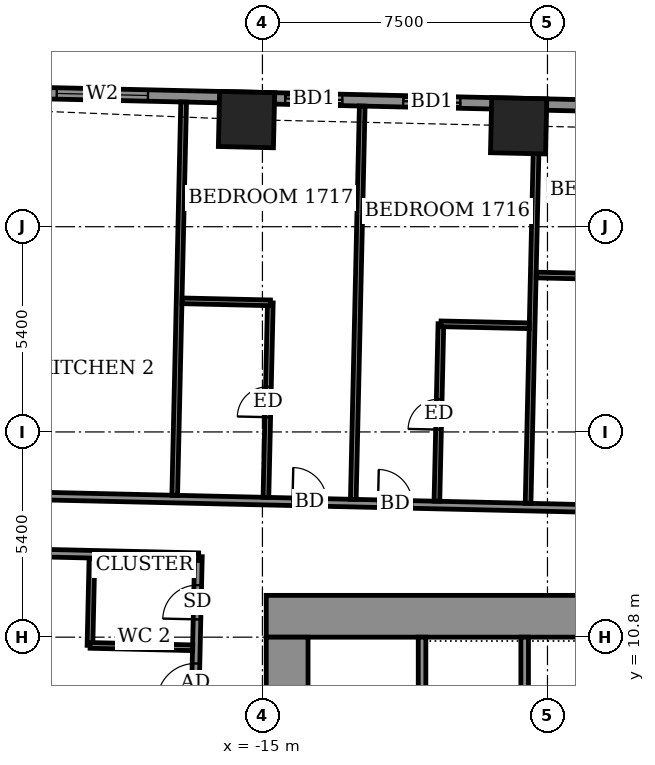
"""IFC4 building model, lengths in metres.
Left out: names, types, materials, properties, quantities, classifications, styles, units other than length and angle.
Written with IfcOpenShell. Run it as: python <this file> out.ifc"""

import sys

from ifc_helpers import new_model, si_unit, direction, frame, frame_2d, origin, origin_2d, place, context, subcontext, project, spatial, rectangle, extrude, element, fill, save


model = new_model("IFC4")
c1 = context("Model", 3, precision=1e-05, world=origin(), true_north=direction((0.0, 1.0)))
c2 = subcontext(c1, "Body", "Model", "MODEL_VIEW")
j1 = project(units=[si_unit("LENGTHUNIT", "METRE"), si_unit("PLANEANGLEUNIT", "RADIAN")], contexts=[c1])
p1 = place(None, origin())
s1 = spatial("IfcSite", under=j1, at=p1, CompositionType="ELEMENT")
p2 = place(p1, origin())
s2 = spatial("IfcBuilding", under=s1, at=p2, CompositionType="ELEMENT")
p3 = place(p2, frame((0.0, 0.0, 71.1)))
s3 = spatial("IfcBuildingStorey", under=s2, at=p3, CompositionType="ELEMENT", Elevation=71.1)
for number, where, z_axis, x_axis in (
    (1, (-8.259, 24.255, -0.55), (0.0, 0.0, 1.0), (-1.0, 0.023, 0.0)),
    (2, (-15.418, 24.418, -0.55), (0.0, 0.0, 1.0), (-1.0, 0.023, 0.0)),
):
    element("IfcColumn", number, at=place(p3, frame(where, z_axis=z_axis, x_axis=x_axis)), inside=s3, PredefinedType="COLUMN", context=c2, shape_type="SweptSolid", body=[
        extrude(rectangle(XDim=1.45, YDim=1.45, at=origin_2d()), origin(), (0.0, 0.0, 1.0), 3.6),
    ])
p4 = place(p3, frame((27.407, 24.021, 0.0), z_axis=(0.0, 0.0, 1.0), x_axis=(-0.99974239923, 0.022696589664, 0.0)))
e3 = element("IfcWall", 3, at=p4, inside=s3, PredefinedType="SOLIDWALL", context=c2, shape_type="SweptSolid", body=[
    extrude(rectangle(XDim=49.836, YDim=0.3, at=frame_2d((24.918, 0.0))), origin(), (0.0, 0.0, 1.0), 3.05),
])
p5 = place(p4, frame((2.998, 0.0, 0.0)))
e4 = element("IfcOpeningElement", 4, at=p5, cuts=e3, PredefinedType="OPENING", context=c2, shape_type="SweptSolid", body=[
    extrude(rectangle(XDim=1.5, YDim=2.4, at=frame_2d((0.75, 1.2))), frame((0.0, 0.16, 0.0), z_axis=(0.0, -1.0, 0.0), x_axis=(1.0, 0.0, 0.0)), (0.0, 0.0, 1.0), 0.32),
])
p6 = place(p4, frame((9.086, 0.0, 0.0)))
e5 = element("IfcOpeningElement", 5, at=p6, cuts=e3, PredefinedType="OPENING", context=c2, shape_type="SweptSolid", body=[
    extrude(rectangle(XDim=1.5, YDim=2.4, at=frame_2d((0.75, 1.2))), frame((0.0, 0.16, 0.0), z_axis=(0.0, -1.0, 0.0), x_axis=(1.0, 0.0, 0.0)), (0.0, 0.0, 1.0), 0.32),
])
p7 = place(p4, frame((15.017, 0.0, 0.0)))
e6 = element("IfcOpeningElement", 6, at=p7, cuts=e3, PredefinedType="OPENING", context=c2, shape_type="SweptSolid", body=[
    extrude(rectangle(XDim=1.5, YDim=2.4, at=frame_2d((0.75, 1.2))), frame((0.0, 0.16, 0.0), z_axis=(0.0, -1.0, 0.0), x_axis=(1.0, 0.0, 0.0)), (0.0, 0.0, 1.0), 0.32),
])
p8 = place(p4, frame((18.124, 0.0, 0.0)))
e7 = element("IfcOpeningElement", 7, at=p8, cuts=e3, PredefinedType="OPENING", context=c2, shape_type="SweptSolid", body=[
    extrude(rectangle(XDim=1.5, YDim=2.4, at=frame_2d((0.75, 1.2))), frame((0.0, 0.16, 0.0), z_axis=(0.0, -1.0, 0.0), x_axis=(1.0, 0.0, 0.0)), (0.0, 0.0, 1.0), 0.32),
])
p9 = place(p4, frame((23.149, 0.0, 0.0)))
e8 = element("IfcOpeningElement", 8, at=p9, cuts=e3, PredefinedType="OPENING", context=c2, shape_type="SweptSolid", body=[
    extrude(rectangle(XDim=1.5, YDim=2.4, at=frame_2d((0.75, 1.2))), frame((0.0, 0.16, 0.0), z_axis=(0.0, -1.0, 0.0), x_axis=(1.0, 0.0, 0.0)), (0.0, 0.0, 1.0), 0.32),
])
p10 = place(p4, frame((26.405, 0.0, 0.0)))
e9 = element("IfcOpeningElement", 9, at=p10, cuts=e3, PredefinedType="OPENING", context=c2, shape_type="SweptSolid", body=[
    extrude(rectangle(XDim=1.2, YDim=2.4, at=frame_2d((0.6, 1.2))), frame((0.0, 0.16, 0.0), z_axis=(0.0, -1.0, 0.0), x_axis=(1.0, 0.0, 0.0)), (0.0, 0.0, 1.0), 0.32),
])
p11 = place(p4, frame((31.986, 0.0, 0.0)))
e10 = element("IfcOpeningElement", 10, at=p11, cuts=e3, PredefinedType="OPENING", context=c2, shape_type="SweptSolid", body=[
    extrude(rectangle(XDim=1.5, YDim=2.4, at=frame_2d((0.75, 1.2))), frame((0.0, 0.16, 0.0), z_axis=(0.0, -1.0, 0.0), x_axis=(1.0, 0.0, 0.0)), (0.0, 0.0, 1.0), 0.32),
])
p12 = place(p4, frame((37.211, 0.0, 0.0)))
e11 = element("IfcOpeningElement", 11, at=p12, cuts=e3, PredefinedType="OPENING", context=c2, shape_type="SweptSolid", body=[
    extrude(rectangle(XDim=1.5, YDim=2.4, at=frame_2d((0.75, 1.2))), frame((0.0, 0.16, 0.0), z_axis=(0.0, -1.0, 0.0), x_axis=(1.0, 0.0, 0.0)), (0.0, 0.0, 1.0), 0.32),
])
p13 = place(p4, frame((40.317, 0.0, 0.0)))
e12 = element("IfcOpeningElement", 12, at=p13, cuts=e3, PredefinedType="OPENING", context=c2, shape_type="SweptSolid", body=[
    extrude(rectangle(XDim=1.5, YDim=2.4, at=frame_2d((0.75, 1.2))), frame((0.0, 0.16, 0.0), z_axis=(0.0, -1.0, 0.0), x_axis=(1.0, 0.0, 0.0)), (0.0, 0.0, 1.0), 0.32),
])
p14 = place(p4, frame((45.431, 0.0, 0.9)))
e13 = element("IfcOpeningElement", 13, at=p14, cuts=e3, PredefinedType="OPENING", context=c2, shape_type="SweptSolid", body=[
    extrude(rectangle(XDim=2.4, YDim=1.5, at=frame_2d((1.2, 0.75))), frame((0.0, 0.16, 0.0), z_axis=(0.0, -1.0, 0.0), x_axis=(1.0, 0.0, 0.0)), (0.0, 0.0, 1.0), 0.32),
])
p15 = place(p3, frame((-17.287, -13.625, 0.0), z_axis=(0.0, 0.0, 1.0), x_axis=(0.022712214871, 0.999742044377, 0.0)))
e14 = element("IfcWall", 14, at=p15, inside=s3, PredefinedType="PARTITIONING", context=c2, shape_type="SweptSolid", body=[
    extrude(rectangle(XDim=26.551, YDim=0.2, at=frame_2d((13.275, 0.0))), origin(), (0.0, 0.0, 1.0), 3.05),
])
p16 = place(p15, frame((22.738, 0.0, 0.0)))
e15 = element("IfcOpeningElement", 15, at=p16, cuts=e14, PredefinedType="OPENING", context=c2, shape_type="SweptSolid", body=[
    extrude(rectangle(XDim=1.0, YDim=2.1, at=frame_2d((0.5, 1.05))), frame((0.0, 0.11, 0.0), z_axis=(0.0, -1.0, 0.0), x_axis=(1.0, 0.0, 0.0)), (0.0, 0.0, 1.0), 0.22),
])
p17 = place(p15, frame((24.9, 0.0, 0.0)))
e16 = element("IfcOpeningElement", 16, at=p17, cuts=e14, PredefinedType="OPENING", context=c2, shape_type="SweptSolid", body=[
    extrude(rectangle(XDim=0.9, YDim=2.1, at=frame_2d((0.45, 1.05))), frame((0.0, 0.11, 0.0), z_axis=(0.0, -1.0, 0.0), x_axis=(1.0, 0.0, 0.0)), (0.0, 0.0, 1.0), 0.22),
])
p18 = place(p15, frame((20.3, 0.0, 0.0)))
e17 = element("IfcOpeningElement", 17, at=p18, cuts=e14, PredefinedType="OPENING", context=c2, shape_type="SweptSolid", body=[
    extrude(rectangle(XDim=1.0, YDim=2.1, at=frame_2d((0.5, 1.05))), frame((0.0, 0.11, 0.0), z_axis=(0.0, -1.0, 0.0), x_axis=(1.0, 0.0, 0.0)), (0.0, 0.0, 1.0), 0.22),
])
p19 = place(p15, frame((15.025, 0.0, 0.0)))
e18 = element("IfcOpeningElement", 18, at=p19, cuts=e14, PredefinedType="OPENING", context=c2, shape_type="SweptSolid", body=[
    extrude(rectangle(XDim=1.0, YDim=2.1, at=frame_2d((0.5, 1.05))), frame((0.0, 0.11, 0.0), z_axis=(0.0, -1.0, 0.0), x_axis=(1.0, 0.0, 0.0)), (0.0, 0.0, 1.0), 0.22),
])
p20 = place(p15, frame((17.525, 0.0, 0.0)))
e19 = element("IfcOpeningElement", 19, at=p20, cuts=e14, PredefinedType="OPENING", context=c2, shape_type="SweptSolid", body=[
    extrude(rectangle(XDim=0.9, YDim=2.1, at=frame_2d((0.45, 1.05))), frame((0.0, 0.11, 0.0), z_axis=(0.0, -1.0, 0.0), x_axis=(1.0, 0.0, 0.0)), (0.0, 0.0, 1.0), 0.22),
])
p21 = place(p15, frame((11.678, 0.0, 0.0)))
e20 = element("IfcOpeningElement", 20, at=p21, cuts=e14, PredefinedType="OPENING", context=c2, shape_type="SweptSolid", body=[
    extrude(rectangle(XDim=1.0, YDim=2.1, at=frame_2d((0.5, 1.05))), frame((0.0, 0.11, 0.0), z_axis=(0.0, -1.0, 0.0), x_axis=(1.0, 0.0, 0.0)), (0.0, 0.0, 1.0), 0.22),
])
p22 = place(p15, frame((8.45, 0.0, 0.0)))
e21 = element("IfcOpeningElement", 21, at=p22, cuts=e14, PredefinedType="OPENING", context=c2, shape_type="SweptSolid", body=[
    extrude(rectangle(XDim=1.0, YDim=2.1, at=frame_2d((0.5, 1.05))), frame((0.0, 0.11, 0.0), z_axis=(0.0, -1.0, 0.0), x_axis=(1.0, 0.0, 0.0)), (0.0, 0.0, 1.0), 0.22),
])
p23 = place(p15, frame((6.275, 0.0, 0.0)))
e22 = element("IfcOpeningElement", 22, at=p23, cuts=e14, PredefinedType="OPENING", context=c2, shape_type="SweptSolid", body=[
    extrude(rectangle(XDim=0.9, YDim=2.1, at=frame_2d((0.45, 1.05))), frame((0.0, 0.11, 0.0), z_axis=(0.0, -1.0, 0.0), x_axis=(1.0, 0.0, 0.0)), (0.0, 0.0, 1.0), 0.22),
])
p24 = place(p15, frame((1.062, 0.0, 0.0)))
e23 = element("IfcOpeningElement", 23, at=p24, cuts=e14, PredefinedType="OPENING", context=c2, shape_type="SweptSolid", body=[
    extrude(rectangle(XDim=1.0, YDim=2.1, at=frame_2d((0.5, 1.05))), frame((0.0, 0.11, 0.0), z_axis=(0.0, -1.0, 0.0), x_axis=(1.0, 0.0, 0.0)), (0.0, 0.0, 1.0), 0.22),
])
p25 = place(p15, frame((3.875, 0.0, 0.0)))
e24 = element("IfcOpeningElement", 24, at=p25, cuts=e14, PredefinedType="OPENING", context=c2, shape_type="SweptSolid", body=[
    extrude(rectangle(XDim=0.9, YDim=2.1, at=frame_2d((0.45, 1.05))), frame((0.0, 0.11, 0.0), z_axis=(0.0, -1.0, 0.0), x_axis=(1.0, 0.0, 0.0)), (0.0, 0.0, 1.0), 0.22),
])
p26 = place(p3, frame((-19.538, 10.583, 0.0), z_axis=(0.0, 0.0, 1.0), x_axis=(0.022612884682, 0.999744296031, 0.0)))
e25 = element("IfcWall", 25, at=p26, inside=s3, PredefinedType="PARTITIONING", context=c2, shape_type="SweptSolid", body=[
    extrude(rectangle(XDim=2.3, YDim=0.15, at=frame_2d((1.15, 0.0))), origin(), (0.0, 0.0, 1.0), 3.05),
])
p27 = place(p3, frame((-19.533, 10.583, 0.0), z_axis=(0.0, 0.0, 1.0), x_axis=(0.999736155505, -0.022969966847, 0.0)))
e26 = element("IfcWall", 26, at=p27, inside=s3, PredefinedType="PARTITIONING", context=c2, shape_type="SweptSolid", body=[
    extrude(rectangle(XDim=2.7, YDim=0.15, at=frame_2d((1.35, 0.0))), origin(), (0.0, 0.0, 1.0), 3.05),
])
p28 = place(p3, frame((-25.515, 13.119, 0.0), z_axis=(0.0, 0.0, 1.0), x_axis=(0.999741550249, -0.022733954903, 0.0)))
e27 = element("IfcWall", 27, at=p28, inside=s3, PredefinedType="PARTITIONING", context=c2, shape_type="SweptSolid", body=[
    extrude(rectangle(XDim=8.838, YDim=0.2, at=frame_2d((4.419, 0.0))), origin(), (0.0, 0.0, 1.0), 3.05),
])
p29 = place(p3, frame((-25.481, 14.619, 0.0), z_axis=(0.0, 0.0, 1.0), x_axis=(0.999742349682, -0.022698772048, 0.0)))
e28 = element("IfcWall", 28, at=p29, inside=s3, PredefinedType="PARTITIONING", context=c2, shape_type="SweptSolid", body=[
    extrude(rectangle(XDim=54.886, YDim=0.2, at=frame_2d((27.443, 0.0))), origin(), (0.0, 0.0, 1.0), 3.05),
])
p30 = place(p29, frame((52.093, 0.0, 0.0)))
e29 = element("IfcOpeningElement", 29, at=p30, cuts=e28, PredefinedType="OPENING", context=c2, shape_type="SweptSolid", body=[
    extrude(rectangle(XDim=1.0, YDim=2.1, at=frame_2d((0.5, 1.05))), frame((0.0, 0.11, 0.0), z_axis=(0.0, -1.0, 0.0), x_axis=(1.0, 0.0, 0.0)), (0.0, 0.0, 1.0), 0.22),
])
p31 = place(p29, frame((46.325, 0.0, 0.0)))
e30 = element("IfcOpeningElement", 30, at=p31, cuts=e28, PredefinedType="OPENING", context=c2, shape_type="SweptSolid", body=[
    extrude(rectangle(XDim=0.9, YDim=2.1, at=frame_2d((0.45, 1.05))), frame((0.0, 0.11, 0.0), z_axis=(0.0, -1.0, 0.0), x_axis=(1.0, 0.0, 0.0)), (0.0, 0.0, 1.0), 0.22),
])
p32 = place(p29, frame((41.275, 0.0, 0.0)))
e31 = element("IfcOpeningElement", 31, at=p32, cuts=e28, PredefinedType="OPENING", context=c2, shape_type="SweptSolid", body=[
    extrude(rectangle(XDim=0.9, YDim=2.1, at=frame_2d((0.45, 1.05))), frame((0.0, 0.11, 0.0), z_axis=(0.0, -1.0, 0.0), x_axis=(1.0, 0.0, 0.0)), (0.0, 0.0, 1.0), 0.22),
])
p33 = place(p29, frame((38.875, 0.0, 0.0)))
e32 = element("IfcOpeningElement", 32, at=p33, cuts=e28, PredefinedType="OPENING", context=c2, shape_type="SweptSolid", body=[
    extrude(rectangle(XDim=0.9, YDim=2.1, at=frame_2d((0.45, 1.05))), frame((0.0, 0.11, 0.0), z_axis=(0.0, -1.0, 0.0), x_axis=(1.0, 0.0, 0.0)), (0.0, 0.0, 1.0), 0.22),
])
p34 = place(p29, frame((31.95, 0.0, 0.0)))
e33 = element("IfcOpeningElement", 33, at=p34, cuts=e28, PredefinedType="OPENING", context=c2, shape_type="SweptSolid", body=[
    extrude(rectangle(XDim=0.9, YDim=2.1, at=frame_2d((0.45, 1.05))), frame((0.0, 0.11, 0.0), z_axis=(0.0, -1.0, 0.0), x_axis=(1.0, 0.0, 0.0)), (0.0, 0.0, 1.0), 0.22),
])
p35 = place(p29, frame((29.8, 0.0, 0.0)))
e34 = element("IfcOpeningElement", 34, at=p35, cuts=e28, PredefinedType="OPENING", context=c2, shape_type="SweptSolid", body=[
    extrude(rectangle(XDim=0.9, YDim=2.1, at=frame_2d((0.45, 1.05))), frame((0.0, 0.11, 0.0), z_axis=(0.0, -1.0, 0.0), x_axis=(1.0, 0.0, 0.0)), (0.0, 0.0, 1.0), 0.22),
])
p36 = place(p29, frame((22.875, 0.0, 0.0)))
e35 = element("IfcOpeningElement", 35, at=p36, cuts=e28, PredefinedType="OPENING", context=c2, shape_type="SweptSolid", body=[
    extrude(rectangle(XDim=0.9, YDim=2.1, at=frame_2d((0.45, 1.05))), frame((0.0, 0.11, 0.0), z_axis=(0.0, -1.0, 0.0), x_axis=(1.0, 0.0, 0.0)), (0.0, 0.0, 1.0), 0.22),
])
p37 = place(p29, frame((20.675, 0.0, 0.0)))
e36 = element("IfcOpeningElement", 36, at=p37, cuts=e28, PredefinedType="OPENING", context=c2, shape_type="SweptSolid", body=[
    extrude(rectangle(XDim=0.9, YDim=2.1, at=frame_2d((0.45, 1.05))), frame((0.0, 0.11, 0.0), z_axis=(0.0, -1.0, 0.0), x_axis=(1.0, 0.0, 0.0)), (0.0, 0.0, 1.0), 0.22),
])
p38 = place(p29, frame((13.525, 0.0, 0.0)))
e37 = element("IfcOpeningElement", 37, at=p38, cuts=e28, PredefinedType="OPENING", context=c2, shape_type="SweptSolid", body=[
    extrude(rectangle(XDim=0.9, YDim=2.1, at=frame_2d((0.45, 1.05))), frame((0.0, 0.11, 0.0), z_axis=(0.0, -1.0, 0.0), x_axis=(1.0, 0.0, 0.0)), (0.0, 0.0, 1.0), 0.22),
])
p39 = place(p29, frame((11.275, 0.0, 0.0)))
e38 = element("IfcOpeningElement", 38, at=p39, cuts=e28, PredefinedType="OPENING", context=c2, shape_type="SweptSolid", body=[
    extrude(rectangle(XDim=0.9, YDim=2.1, at=frame_2d((0.45, 1.05))), frame((0.0, 0.11, 0.0), z_axis=(0.0, -1.0, 0.0), x_axis=(1.0, 0.0, 0.0)), (0.0, 0.0, 1.0), 0.22),
])
p40 = place(p29, frame((3.079, 0.0, 0.0)))
e39 = element("IfcOpeningElement", 39, at=p40, cuts=e28, PredefinedType="OPENING", context=c2, shape_type="SweptSolid", body=[
    extrude(rectangle(XDim=1.0, YDim=2.1, at=frame_2d((0.5, 1.05))), frame((0.0, 0.11, 0.0), z_axis=(0.0, -1.0, 0.0), x_axis=(1.0, 0.0, 0.0)), (0.0, 0.0, 1.0), 0.22),
])
p41 = place(p3, frame((-17.308, 14.533, 0.0), z_axis=(0.0, 0.0, 1.0), x_axis=(0.022713904397, 0.999742005993, 0.0)))
e40 = element("IfcWall", 40, at=p41, inside=s3, PredefinedType="PARTITIONING", context=c2, shape_type="SweptSolid", body=[
    extrude(rectangle(XDim=10.351, YDim=0.15, at=frame_2d((5.175, 0.0))), origin(), (0.0, 0.0, 1.0), 2.55),
])
p42 = place(p3, frame((-14.908, 14.479, 0.0), z_axis=(0.0, 0.0, 1.0), x_axis=(0.02265315592, 0.999743384338, 0.0)))
e41 = element("IfcWall", 41, at=p42, inside=s3, PredefinedType="PARTITIONING", context=c2, shape_type="SweptSolid", body=[
    extrude(rectangle(XDim=5.119, YDim=0.15, at=frame_2d((2.56, 0.0))), origin(), (0.0, 0.0, 1.0), 3.05),
])
p43 = place(p42, frame((2.11, 0.0, 0.0)))
e42 = element("IfcOpeningElement", 42, at=p43, cuts=e41, PredefinedType="OPENING", context=c2, shape_type="SweptSolid", body=[
    extrude(rectangle(XDim=0.8, YDim=2.1, at=frame_2d((0.4, 1.05))), frame((0.0, 0.085, 0.0), z_axis=(0.0, -1.0, 0.0), x_axis=(1.0, 0.0, 0.0)), (0.0, 0.0, 1.0), 0.17),
])
p44 = place(p3, frame((-12.609, 14.427, 0.0), z_axis=(0.0, 0.0, 1.0), x_axis=(0.022693005506, 0.999742480592, 0.0)))
e43 = element("IfcWall", 43, at=p44, inside=s3, PredefinedType="PARTITIONING", context=c2, shape_type="SweptSolid", body=[
    extrude(rectangle(XDim=10.35, YDim=0.15, at=frame_2d((5.175, 0.0))), origin(), (0.0, 0.0, 1.0), 2.55),
])
p45 = place(p3, frame((-10.409, 14.377, 0.0), z_axis=(0.0, 0.0, 1.0), x_axis=(0.022483854533, 0.99974720619, 0.0)))
e44 = element("IfcWall", 44, at=p45, inside=s3, PredefinedType="PARTITIONING", context=c2, shape_type="SweptSolid", body=[
    extrude(rectangle(XDim=4.669, YDim=0.15, at=frame_2d((2.334, 0.0))), origin(), (0.0, 0.0, 1.0), 3.05),
])
p46 = place(p45, frame((1.885, 0.0, 0.0)))
e45 = element("IfcOpeningElement", 45, at=p46, cuts=e44, PredefinedType="OPENING", context=c2, shape_type="SweptSolid", body=[
    extrude(rectangle(XDim=0.8, YDim=2.1, at=frame_2d((0.4, 1.05))), frame((0.0, 0.085, 0.0), z_axis=(0.0, -1.0, 0.0), x_axis=(1.0, 0.0, 0.0)), (0.0, 0.0, 1.0), 0.17),
])
p47 = place(p3, frame((-8.01, 14.322, 0.0), z_axis=(0.0, 0.0, 1.0), x_axis=(0.022714440015, 0.999741993824, 0.0)))
e46 = element("IfcWall", 46, at=p47, inside=s3, PredefinedType="PARTITIONING", context=c2, shape_type="SweptSolid", body=[
    extrude(rectangle(XDim=10.351, YDim=0.15, at=frame_2d((5.175, 0.0))), origin(), (0.0, 0.0, 1.0), 3.05),
])
for number, where, z_axis, x_axis in (
    (47, (-10.302, 19.045, 0.0), (0.0, 0.0, 1.0), (1.0, -0.022, 0.0)),
    (48, (-17.115, 19.65, 0.0), (0.0, 0.0, 1.0), (1.0, -0.023, 0.0)),
):
    element("IfcWall", number, at=place(p3, frame(where, z_axis=z_axis, x_axis=x_axis)), inside=s3, PredefinedType="PARTITIONING", context=c2, shape_type="SweptSolid", body=[
        extrude(rectangle(XDim=2.325, YDim=0.15, at=frame_2d((1.163, 0.0))), origin(), (0.0, 0.0, 1.0), 3.05),
    ])
p48 = place(p3, frame((-7.797, 20.329, 0.0), z_axis=(0.0, 0.0, 1.0), x_axis=(0.999738137323, -0.022883548292, 0.0)))
e49 = element("IfcWall", 49, at=p48, inside=s3, PredefinedType="PARTITIONING", context=c2, shape_type="SweptSolid", body=[
    extrude(rectangle(XDim=2.326, YDim=0.15, at=frame_2d((1.163, 0.0))), origin(), (0.0, 0.0, 1.0), 3.05),
])
p49 = place(p3, frame((-14.9, 11.35, 0.0), z_axis=(0.0, 0.0, 1.0), x_axis=(1.0, 0.0, 0.0)))
e50 = element("IfcWall", 50, at=p49, inside=s3, PredefinedType="SHEAR", context=c2, shape_type="SweptSolid", body=[
    extrude(rectangle(XDim=29.8, YDim=1.1, at=frame_2d((14.9, 0.0))), origin(), (0.0, 0.0, 1.0), 3.6),
])
p50 = place(p3, frame((-14.35, -10.8, 0.0), z_axis=(0.0, 0.0, 1.0), x_axis=(0.0, 1.0, 0.0)))
e51 = element("IfcWall", 51, at=p50, inside=s3, PredefinedType="SHEAR", context=c2, shape_type="SweptSolid", body=[
    extrude(rectangle(XDim=21.6, YDim=1.1, at=frame_2d((10.8, 0.0))), origin(), (0.0, 0.0, 1.0), 3.6),
])
p51 = place(p50, frame((8.25, 0.0, 0.0)))
e52 = element("IfcOpeningElement", 52, at=p51, cuts=e51, PredefinedType="OPENING", context=c2, shape_type="SweptSolid", body=[
    extrude(rectangle(XDim=1.2, YDim=2.1, at=frame_2d((0.6, 1.05))), frame((0.0, 0.56, 0.0), z_axis=(0.0, -1.0, 0.0), x_axis=(1.0, 0.0, 0.0)), (0.0, 0.0, 1.0), 1.12),
])
p52 = place(p50, frame((15.25, 0.0, 0.0)))
e53 = element("IfcOpeningElement", 53, at=p52, cuts=e51, PredefinedType="OPENING", context=c2, shape_type="SweptSolid", body=[
    extrude(rectangle(XDim=1.2, YDim=2.1, at=frame_2d((0.6, 1.05))), frame((0.0, 0.56, 0.0), z_axis=(0.0, -1.0, 0.0), x_axis=(1.0, 0.0, 0.0)), (0.0, 0.0, 1.0), 1.12),
])
for number, where, z_axis, x_axis in (
    (54, (-10.8, 8.2, 0.0), (0.0, 0.0, 1.0), (0.0, 1.0, 0.0)),
    (55, (-8.1, 8.2, 0.0), (0.0, 0.0, 1.0), (0.0, 1.0, 0.0)),
):
    element("IfcWall", number, at=place(p3, frame(where, z_axis=z_axis, x_axis=x_axis)), inside=s3, PredefinedType="SHEAR", context=c2, shape_type="SweptSolid", body=[
        extrude(rectangle(XDim=2.6, YDim=0.2, at=frame_2d((1.3, 0.0))), origin(), (0.0, 0.0, 1.0), 3.05),
    ])
p53 = place(p12, origin())
e56 = element("IfcDoor", 56, at=p53, inside=s3, OperationType="SLIDING_TO_LEFT", PredefinedType="DOOR", context=c2, shape_type="SweptSolid", body=[
    extrude(rectangle(XDim=1.5, YDim=2.4, at=frame_2d((0.75, 1.2))), frame((0.0, 0.025, 0.0), z_axis=(0.0, -1.0, 0.0), x_axis=(1.0, 0.0, 0.0)), (0.0, 0.0, 1.0), 0.05),
])
fill(e11, e56)
p54 = place(p13, origin())
e57 = element("IfcDoor", 57, at=p54, inside=s3, OperationType="SLIDING_TO_LEFT", PredefinedType="DOOR", context=c2, shape_type="SweptSolid", body=[
    extrude(rectangle(XDim=1.5, YDim=2.4, at=frame_2d((0.75, 1.2))), frame((0.0, 0.025, 0.0), z_axis=(0.0, -1.0, 0.0), x_axis=(1.0, 0.0, 0.0)), (0.0, 0.0, 1.0), 0.05),
])
fill(e12, e57)
p55 = place(p14, origin())
e58 = element("IfcWindow", 58, at=p55, inside=s3, PartitioningType="DOUBLE_PANEL_VERTICAL", PredefinedType="WINDOW", context=c2, shape_type="SweptSolid", body=[
    extrude(rectangle(XDim=2.4, YDim=1.5, at=frame_2d((1.2, 0.75))), frame((0.0, 0.03, 0.0), z_axis=(0.0, -1.0, 0.0), x_axis=(1.0, 0.0, 0.0)), (0.0, 0.0, 1.0), 0.06),
])
fill(e13, e58)
p56 = place(p38, origin())
e59 = element("IfcDoor", 59, at=p56, inside=s3, OperationType="SINGLE_SWING_RIGHT", PredefinedType="DOOR", context=c2, shape_type="SweptSolid", body=[
    extrude(rectangle(XDim=0.9, YDim=2.1, at=frame_2d((0.45, 1.05))), frame((0.0, 0.025, 0.0), z_axis=(0.0, -1.0, 0.0), x_axis=(1.0, 0.0, 0.0)), (0.0, 0.0, 1.0), 0.05),
])
fill(e37, e59)
p57 = place(p46, origin())
e60 = element("IfcDoor", 60, at=p57, inside=s3, OperationType="SINGLE_SWING_RIGHT", PredefinedType="DOOR", context=c2, shape_type="SweptSolid", body=[
    extrude(rectangle(XDim=0.8, YDim=2.1, at=frame_2d((0.4, 1.05))), frame((0.0, 0.025, 0.0), z_axis=(0.0, -1.0, 0.0), x_axis=(1.0, 0.0, 0.0)), (0.0, 0.0, 1.0), 0.05),
])
fill(e45, e60)
p58 = place(p39, origin())
e61 = element("IfcDoor", 61, at=p58, inside=s3, OperationType="SINGLE_SWING_LEFT", PredefinedType="DOOR", context=c2, shape_type="SweptSolid", body=[
    extrude(rectangle(XDim=0.9, YDim=2.1, at=frame_2d((0.45, 1.05))), frame((0.0, 0.025, 0.0), z_axis=(0.0, -1.0, 0.0), x_axis=(1.0, 0.0, 0.0)), (0.0, 0.0, 1.0), 0.05),
])
fill(e38, e61)
p59 = place(p43, origin())
e62 = element("IfcDoor", 62, at=p59, inside=s3, OperationType="SINGLE_SWING_LEFT", PredefinedType="DOOR", context=c2, shape_type="SweptSolid", body=[
    extrude(rectangle(XDim=0.8, YDim=2.1, at=frame_2d((0.4, 1.05))), frame((0.0, 0.025, 0.0), z_axis=(0.0, -1.0, 0.0), x_axis=(1.0, 0.0, 0.0)), (0.0, 0.0, 1.0), 0.05),
])
fill(e42, e62)
p60 = place(p16, origin())
e63 = element("IfcDoor", 63, at=p60, inside=s3, OperationType="SINGLE_SWING_LEFT", PredefinedType="DOOR", context=c2, shape_type="SweptSolid", body=[
    extrude(rectangle(XDim=1.0, YDim=2.1, at=frame_2d((0.5, 1.05))), frame((0.0, 0.025, 0.0), z_axis=(0.0, -1.0, 0.0), x_axis=(1.0, 0.0, 0.0)), (0.0, 0.0, 1.0), 0.05),
])
fill(e15, e63)
p61 = place(p17, origin())
e64 = element("IfcDoor", 64, at=p61, inside=s3, OperationType="SINGLE_SWING_LEFT", PredefinedType="DOOR", context=c2, shape_type="SweptSolid", body=[
    extrude(rectangle(XDim=0.9, YDim=2.1, at=frame_2d((0.45, 1.05))), frame((0.0, 0.025, 0.0), z_axis=(0.0, -1.0, 0.0), x_axis=(1.0, 0.0, 0.0)), (0.0, 0.0, 1.0), 0.05),
])
fill(e16, e64)
save(model, sys.argv[1])
